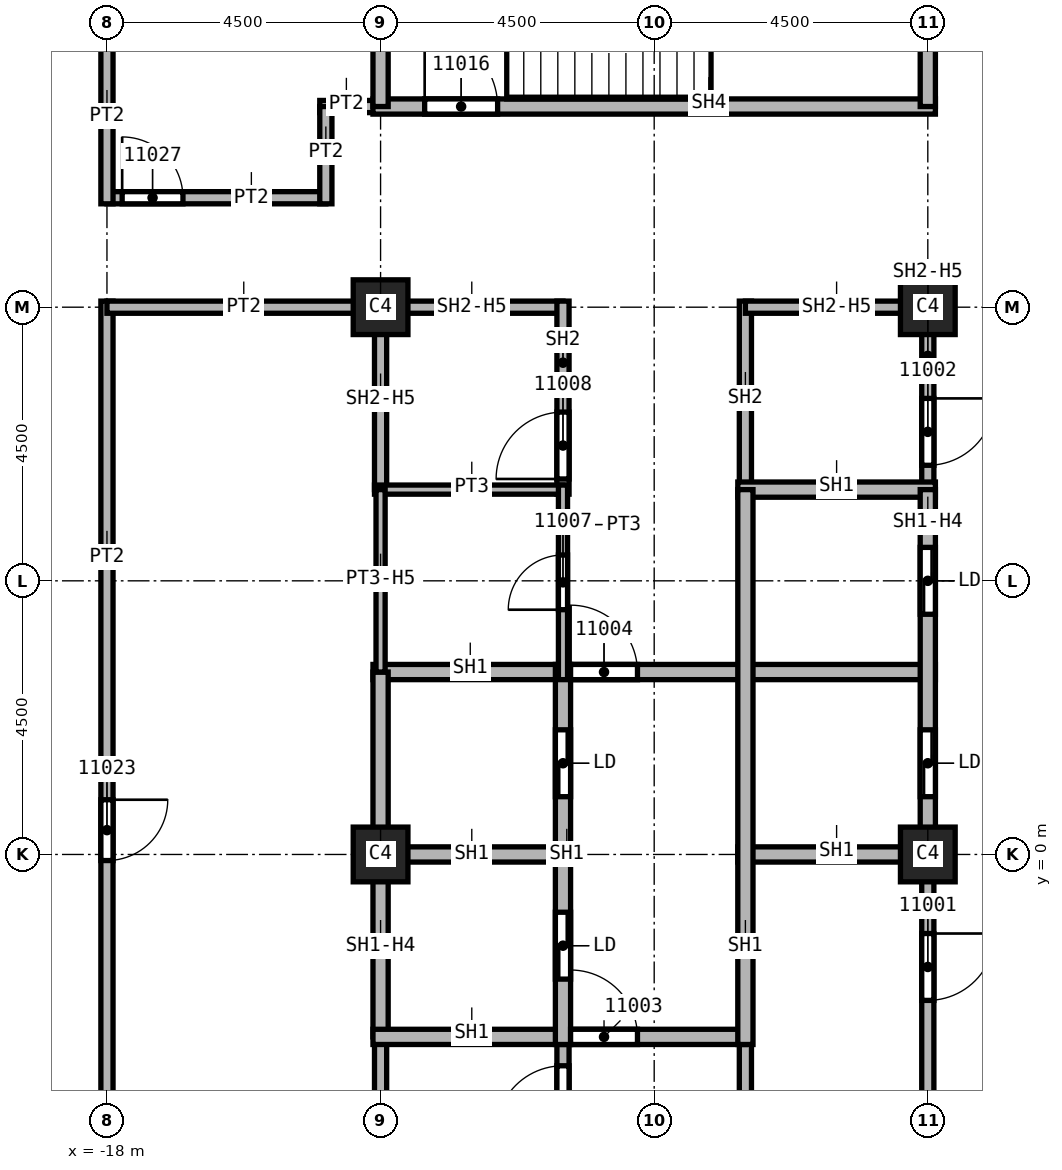
"""IFC4 building model, lengths in metres.
Left out: names, types, materials, properties, quantities, classifications, styles, units other than length and angle.
Written with IfcOpenShell. Run it as: python <this file> out.ifc"""

import sys

from ifc_helpers import new_model, si_unit, direction, frame, frame_2d, origin, origin_2d, place, context, subcontext, project, spatial, rectangle, extrude, element, fill, save


model = new_model("IFC4")
c1 = context("Model", 3, precision=1e-05, world=origin(), true_north=direction((0.0, 1.0)))
c2 = subcontext(c1, "Body", "Model", "MODEL_VIEW")
j1 = project(units=[si_unit("LENGTHUNIT", "METRE"), si_unit("PLANEANGLEUNIT", "RADIAN")], contexts=[c1])
p1 = place(None, origin())
s1 = spatial("IfcSite", under=j1, at=p1, CompositionType="ELEMENT")
p2 = place(p1, origin())
s2 = spatial("IfcBuilding", under=s1, at=p2, CompositionType="ELEMENT")
p3 = place(p2, frame((0.0, 0.0, 188.0)))
s3 = spatial("IfcBuildingStorey", under=s2, at=p3, CompositionType="ELEMENT", Elevation=188.0)
for number, where, z_axis, x_axis in (
    (1, (-4.5, 0.0, 0.0), (0.0, 0.0, 1.0), (1.0, 0.0, 0.0)),
    (2, (-4.5, 9.0, 0.0), (0.0, 0.0, 1.0), (1.0, 0.0, 0.0)),
    (3, (-13.5, 0.0, 0.0), (0.0, 0.0, 1.0), (1.0, 0.0, 0.0)),
    (4, (-13.5, 9.0, 0.0), (0.0, 0.0, 1.0), (1.0, 0.0, 0.0)),
):
    element("IfcColumn", number, at=place(p3, frame(where, z_axis=z_axis, x_axis=x_axis)), inside=s3, PredefinedType="COLUMN", context=c2, shape_type="SweptSolid", body=[
        extrude(rectangle(XDim=0.9, YDim=0.9, at=origin_2d()), origin(), (0.0, 0.0, 1.0), 3.72),
    ])
p4 = place(p3, frame((-18.0, 9.1, 0.0), z_axis=(0.0, 0.0, 1.0), x_axis=(0.0, -1.0, 0.0)))
e5 = element("IfcWall", 5, at=p4, inside=s3, PredefinedType="PARTITIONING", context=c2, shape_type="SweptSolid", body=[
    extrude(rectangle(XDim=18.2, YDim=0.2, at=frame_2d((9.1, 0.0))), origin(), (0.0, 0.0, 1.0), 3.72),
])
p5 = place(p4, frame((16.9, 0.0, 0.0)))
e6 = element("IfcOpeningElement", 6, at=p5, cuts=e5, PredefinedType="OPENING", context=c2, shape_type="SweptSolid", body=[
    extrude(rectangle(XDim=1.0, YDim=2.1, at=frame_2d((0.5, 1.05))), frame((0.0, 0.1, 0.0), z_axis=(0.0, -1.0, 0.0), x_axis=(1.0, 0.0, 0.0)), (0.0, 0.0, 1.0), 0.2),
])
p6 = place(p4, frame((8.2, 0.0, 0.0)))
e7 = element("IfcOpeningElement", 7, at=p6, cuts=e5, PredefinedType="OPENING", context=c2, shape_type="SweptSolid", body=[
    extrude(rectangle(XDim=1.0, YDim=2.1, at=frame_2d((0.5, 1.05))), frame((0.0, 0.1, 0.0), z_axis=(0.0, -1.0, 0.0), x_axis=(1.0, 0.0, 0.0)), (0.0, 0.0, 1.0), 0.2),
])
p7 = place(p3, frame((-18.0, 10.8, 0.0), z_axis=(0.0, 0.0, 1.0), x_axis=(1.0, 0.0, 0.0)))
e8 = element("IfcWall", 8, at=p7, inside=s3, PredefinedType="PARTITIONING", context=c2, shape_type="SweptSolid", body=[
    extrude(rectangle(XDim=3.6, YDim=0.2, at=frame_2d((1.8, 0.0))), origin(), (0.0, 0.0, 1.0), 3.72),
])
p8 = place(p7, frame((0.25, 0.0, 0.0)))
e9 = element("IfcOpeningElement", 9, at=p8, cuts=e8, PredefinedType="OPENING", context=c2, shape_type="SweptSolid", body=[
    extrude(rectangle(XDim=1.0, YDim=2.1, at=frame_2d((0.5, 1.05))), frame((0.0, 0.1, 0.0), z_axis=(0.0, -1.0, 0.0), x_axis=(1.0, 0.0, 0.0)), (0.0, 0.0, 1.0), 0.2),
])
p9 = place(p3, frame((-18.0, 13.6, 0.0), z_axis=(0.0, 0.0, 1.0), x_axis=(0.0, -1.0, 0.0)))
e10 = element("IfcWall", 10, at=p9, inside=s3, PredefinedType="PARTITIONING", context=c2, shape_type="SweptSolid", body=[
    extrude(rectangle(XDim=2.9, YDim=0.2, at=frame_2d((1.45, 0.0))), origin(), (0.0, 0.0, 1.0), 3.72),
])
p10 = place(p3, frame((-14.5, 12.3, 0.0), z_axis=(0.0, 0.0, 1.0), x_axis=(1.0, 0.0, 0.0)))
e11 = element("IfcWall", 11, at=p10, inside=s3, PredefinedType="PARTITIONING", context=c2, shape_type="SweptSolid", body=[
    extrude(rectangle(XDim=1.125, YDim=0.2, at=frame_2d((0.562, 0.0))), origin(), (0.0, 0.0, 1.0), 3.72),
])
p11 = place(p3, frame((-13.5, 9.0, 0.0), z_axis=(0.0, 0.0, 1.0), x_axis=(-1.0, 0.0, 0.0)))
e12 = element("IfcWall", 12, at=p11, inside=s3, PredefinedType="PARTITIONING", context=c2, shape_type="SweptSolid", body=[
    extrude(rectangle(XDim=4.5, YDim=0.2, at=frame_2d((2.25, 0.0))), origin(), (0.0, 0.0, 1.0), 3.72),
])
p12 = place(p3, frame((-14.4, 10.7, 0.0), z_axis=(0.0, 0.0, 1.0), x_axis=(0.0, 1.0, 0.0)))
e13 = element("IfcWall", 13, at=p12, inside=s3, PredefinedType="PARTITIONING", context=c2, shape_type="SweptSolid", body=[
    extrude(rectangle(XDim=1.6, YDim=0.2, at=frame_2d((0.8, 0.0))), origin(), (0.0, 0.0, 1.0), 3.72),
])
p13 = place(p3, frame((-13.6, 9.0, 0.0), z_axis=(0.0, 0.0, 1.0), x_axis=(1.0, 0.0, 0.0)))
e14 = element("IfcWall", 14, at=p13, inside=s3, PredefinedType="SOLIDWALL", context=c2, shape_type="SweptSolid", body=[
    extrude(rectangle(XDim=3.1, YDim=0.2, at=frame_2d((1.55, 0.0))), origin(), (0.0, 0.0, 1.0), 2.958),
])
p14 = place(p3, frame((-13.5, -7.0, 0.0), z_axis=(0.0, 0.0, 1.0), x_axis=(0.0, 1.0, 0.0)))
e15 = element("IfcWall", 15, at=p14, inside=s3, PredefinedType="SOLIDWALL", context=c2, shape_type="SweptSolid", body=[
    extrude(rectangle(XDim=4.0, YDim=0.2, at=frame_2d((2.0, 0.0))), origin(), (0.0, 0.0, 1.0), 2.958),
])
p15 = place(p3, frame((-13.5, 6.0, 0.0), z_axis=(0.0, 0.0, 1.0), x_axis=(0.0, 1.0, 0.0)))
e16 = element("IfcWall", 16, at=p15, inside=s3, PredefinedType="SOLIDWALL", context=c2, shape_type="SweptSolid", body=[
    extrude(rectangle(XDim=3.1, YDim=0.2, at=frame_2d((1.55, 0.0))), origin(), (0.0, 0.0, 1.0), 2.958),
])
p16 = place(p3, frame((-10.5, -7.075, 0.0), z_axis=(0.0, 0.0, 1.0), x_axis=(0.0, 1.0, 0.0)))
e17 = element("IfcWall", 17, at=p16, inside=s3, PredefinedType="SOLIDWALL", context=c2, shape_type="SweptSolid", body=[
    extrude(rectangle(XDim=4.2, YDim=0.2, at=frame_2d((2.1, 0.0))), origin(), (0.0, 0.0, 1.0), 3.72),
])
p17 = place(p16, frame((2.5, 0.0, 0.0)))
e18 = element("IfcOpeningElement", 18, at=p17, cuts=e17, PredefinedType="OPENING", context=c2, shape_type="SweptSolid", body=[
    extrude(rectangle(XDim=1.1, YDim=2.1, at=frame_2d((0.55, 1.05))), frame((0.0, 0.1, 0.0), z_axis=(0.0, -1.0, 0.0), x_axis=(1.0, 0.0, 0.0)), (0.0, 0.0, 1.0), 0.2),
])
p18 = place(p3, frame((-10.5, 5.925, 0.0), z_axis=(0.0, 0.0, 1.0), x_axis=(0.0, 1.0, 0.0)))
e19 = element("IfcWall", 19, at=p18, inside=s3, PredefinedType="SOLIDWALL", context=c2, shape_type="SweptSolid", body=[
    extrude(rectangle(XDim=3.175, YDim=0.2, at=frame_2d((1.587, 0.0))), origin(), (0.0, 0.0, 1.0), 3.72),
])
p19 = place(p18, frame((0.25, 0.0, 0.0)))
e20 = element("IfcOpeningElement", 20, at=p19, cuts=e19, PredefinedType="OPENING", context=c2, shape_type="SweptSolid", body=[
    extrude(rectangle(XDim=1.1, YDim=2.1, at=frame_2d((0.55, 1.05))), frame((0.0, 0.1, 0.0), z_axis=(0.0, -1.0, 0.0), x_axis=(1.0, 0.0, 0.0)), (0.0, 0.0, 1.0), 0.2),
])
p20 = place(p3, frame((-7.5, -9.1, 0.0), z_axis=(0.0, 0.0, 1.0), x_axis=(0.0, 1.0, 0.0)))
e21 = element("IfcWall", 21, at=p20, inside=s3, PredefinedType="SOLIDWALL", context=c2, shape_type="SweptSolid", body=[
    extrude(rectangle(XDim=6.225, YDim=0.2, at=frame_2d((3.113, 0.0))), origin(), (0.0, 0.0, 1.0), 3.72),
])
p21 = place(p3, frame((-7.5, 6.0, 0.0), z_axis=(0.0, 0.0, 1.0), x_axis=(0.0, 1.0, 0.0)))
e22 = element("IfcWall", 22, at=p21, inside=s3, PredefinedType="SOLIDWALL", context=c2, shape_type="SweptSolid", body=[
    extrude(rectangle(XDim=3.1, YDim=0.2, at=frame_2d((1.55, 0.0))), origin(), (0.0, 0.0, 1.0), 3.72),
])
p22 = place(p3, frame((-7.5, 9.0, 0.0), z_axis=(0.0, 0.0, 1.0), x_axis=(1.0, 0.0, 0.0)))
e23 = element("IfcWall", 23, at=p22, inside=s3, PredefinedType="SOLIDWALL", context=c2, shape_type="SweptSolid", body=[
    extrude(rectangle(XDim=3.0, YDim=0.2, at=frame_2d((1.5, 0.0))), origin(), (0.0, 0.0, 1.0), 2.958),
])
p23 = place(p3, frame((-4.5, 0.0, 0.0), z_axis=(0.0, 0.0, 1.0), x_axis=(0.0, -1.0, 0.0)))
e24 = element("IfcWall", 24, at=p23, inside=s3, PredefinedType="SOLIDWALL", context=c2, shape_type="SweptSolid", body=[
    extrude(rectangle(XDim=9.1, YDim=0.2, at=frame_2d((4.55, 0.0))), origin(), (0.0, 0.0, 1.0), 2.958),
])
p24 = place(p23, frame((1.3, 0.0, 0.0)))
e25 = element("IfcOpeningElement", 25, at=p24, cuts=e24, PredefinedType="OPENING", context=c2, shape_type="SweptSolid", body=[
    extrude(rectangle(XDim=1.1, YDim=2.1, at=frame_2d((0.55, 1.05))), frame((0.0, 0.1, 0.0), z_axis=(0.0, -1.0, 0.0), x_axis=(1.0, 0.0, 0.0)), (0.0, 0.0, 1.0), 0.2),
])
p25 = place(p3, frame((-4.5, 9.1, 0.0), z_axis=(0.0, 0.0, 1.0), x_axis=(0.0, -1.0, 0.0)))
e26 = element("IfcWall", 26, at=p25, inside=s3, PredefinedType="SOLIDWALL", context=c2, shape_type="SweptSolid", body=[
    extrude(rectangle(XDim=3.1, YDim=0.2, at=frame_2d((1.55, 0.0))), origin(), (0.0, 0.0, 1.0), 2.958),
])
p26 = place(p25, frame((1.6, 0.0, 0.0)))
e27 = element("IfcOpeningElement", 27, at=p26, cuts=e26, PredefinedType="OPENING", context=c2, shape_type="SweptSolid", body=[
    extrude(rectangle(XDim=1.1, YDim=2.1, at=frame_2d((0.55, 1.05))), frame((0.0, 0.1, 0.0), z_axis=(0.0, -1.0, 0.0), x_axis=(1.0, 0.0, 0.0)), (0.0, 0.0, 1.0), 0.2),
])
p27 = place(p3, frame((-13.625, 0.0, 0.0), z_axis=(0.0, 0.0, 1.0), x_axis=(1.0, 0.0, 0.0)))
e28 = element("IfcWall", 28, at=p27, inside=s3, PredefinedType="SOLIDWALL", context=c2, shape_type="SweptSolid", body=[
    extrude(rectangle(XDim=3.125, YDim=0.25, at=frame_2d((1.562, 0.0))), origin(), (0.0, 0.0, 1.0), 3.72),
])
p28 = place(p3, frame((-13.625, 3.0, 0.0), z_axis=(0.0, 0.0, 1.0), x_axis=(1.0, 0.0, 0.0)))
e29 = element("IfcWall", 29, at=p28, inside=s3, PredefinedType="SOLIDWALL", context=c2, shape_type="SweptSolid", body=[
    extrude(rectangle(XDim=9.25, YDim=0.25, at=frame_2d((4.625, 0.0))), origin(), (0.0, 0.0, 1.0), 3.72),
])
p29 = place(p28, frame((3.25, 0.0, 0.0)))
e30 = element("IfcOpeningElement", 30, at=p29, cuts=e29, PredefinedType="OPENING", context=c2, shape_type="SweptSolid", body=[
    extrude(rectangle(XDim=1.1, YDim=2.1, at=frame_2d((0.55, 1.05))), frame((0.0, 0.125, 0.0), z_axis=(0.0, -1.0, 0.0), x_axis=(1.0, 0.0, 0.0)), (0.0, 0.0, 1.0), 0.25),
])
p30 = place(p3, frame((-13.5, -3.0, 0.0), z_axis=(0.0, 0.0, 1.0), x_axis=(0.0, 1.0, 0.0)))
e31 = element("IfcWall", 31, at=p30, inside=s3, PredefinedType="SOLIDWALL", context=c2, shape_type="SweptSolid", body=[
    extrude(rectangle(XDim=6.0, YDim=0.25, at=frame_2d((3.0, 0.0))), origin(), (0.0, 0.0, 1.0), 2.958),
])
p31 = place(p3, frame((-13.625, -3.0, 0.0), z_axis=(0.0, 0.0, 1.0), x_axis=(1.0, 0.0, 0.0)))
e32 = element("IfcWall", 32, at=p31, inside=s3, PredefinedType="SOLIDWALL", context=c2, shape_type="SweptSolid", body=[
    extrude(rectangle(XDim=6.125, YDim=0.25, at=frame_2d((3.062, 0.0))), origin(), (0.0, 0.0, 1.0), 3.72),
])
p32 = place(p31, frame((3.25, 0.0, 0.0)))
e33 = element("IfcOpeningElement", 33, at=p32, cuts=e32, PredefinedType="OPENING", context=c2, shape_type="SweptSolid", body=[
    extrude(rectangle(XDim=1.1, YDim=2.1, at=frame_2d((0.55, 1.05))), frame((0.0, 0.125, 0.0), z_axis=(0.0, -1.0, 0.0), x_axis=(1.0, 0.0, 0.0)), (0.0, 0.0, 1.0), 0.25),
])
p33 = place(p3, frame((-10.5, -3.125, 0.0), z_axis=(0.0, 0.0, 1.0), x_axis=(0.0, 1.0, 0.0)))
e34 = element("IfcWall", 34, at=p33, inside=s3, PredefinedType="SOLIDWALL", context=c2, shape_type="SweptSolid", body=[
    extrude(rectangle(XDim=6.25, YDim=0.25, at=frame_2d((3.125, 0.0))), origin(), (0.0, 0.0, 1.0), 3.72),
])
p34 = place(p33, frame((1.075, 0.0, 0.0)))
e35 = element("IfcOpeningElement", 35, at=p34, cuts=e34, PredefinedType="OPENING", context=c2, shape_type="SweptSolid", body=[
    extrude(rectangle(XDim=1.1, YDim=2.1, at=frame_2d((0.55, 1.05))), frame((0.0, 0.125, 0.0), z_axis=(0.0, -1.0, 0.0), x_axis=(1.0, 0.0, 0.0)), (0.0, 0.0, 1.0), 0.25),
])
p35 = place(p33, frame((4.075, 0.0, 0.0)))
e36 = element("IfcOpeningElement", 36, at=p35, cuts=e34, PredefinedType="OPENING", context=c2, shape_type="SweptSolid", body=[
    extrude(rectangle(XDim=1.1, YDim=2.1, at=frame_2d((0.55, 1.05))), frame((0.0, 0.125, 0.0), z_axis=(0.0, -1.0, 0.0), x_axis=(1.0, 0.0, 0.0)), (0.0, 0.0, 1.0), 0.25),
])
for number, where, z_axis, x_axis in (
    (37, (-7.625, 0.0, 0.0), (0.0, 0.0, 1.0), (1.0, 0.0, 0.0)),
    (38, (-7.625, 6.0, 0.0), (0.0, 0.0, 1.0), (1.0, 0.0, 0.0)),
):
    element("IfcWall", number, at=place(p3, frame(where, z_axis=z_axis, x_axis=x_axis)), inside=s3, PredefinedType="SOLIDWALL", context=c2, shape_type="SweptSolid", body=[
        extrude(rectangle(XDim=3.25, YDim=0.25, at=frame_2d((1.625, 0.0))), origin(), (0.0, 0.0, 1.0), 3.72),
    ])
p36 = place(p3, frame((-7.5, -3.125, 0.0), z_axis=(0.0, 0.0, 1.0), x_axis=(0.0, 1.0, 0.0)))
e39 = element("IfcWall", 39, at=p36, inside=s3, PredefinedType="SOLIDWALL", context=c2, shape_type="SweptSolid", body=[
    extrude(rectangle(XDim=9.125, YDim=0.25, at=frame_2d((4.562, 0.0))), origin(), (0.0, 0.0, 1.0), 3.72),
])
p37 = place(p3, frame((-4.5, 6.0, 0.0), z_axis=(0.0, 0.0, 1.0), x_axis=(0.0, -1.0, 0.0)))
e40 = element("IfcWall", 40, at=p37, inside=s3, PredefinedType="SOLIDWALL", context=c2, shape_type="SweptSolid", body=[
    extrude(rectangle(XDim=6.0, YDim=0.25, at=frame_2d((3.0, 0.0))), origin(), (0.0, 0.0, 1.0), 2.958),
])
p38 = place(p37, frame((3.95, 0.0, 0.0)))
e41 = element("IfcOpeningElement", 41, at=p38, cuts=e40, PredefinedType="OPENING", context=c2, shape_type="SweptSolid", body=[
    extrude(rectangle(XDim=1.1, YDim=2.1, at=frame_2d((0.55, 1.05))), frame((0.0, 0.125, 0.0), z_axis=(0.0, -1.0, 0.0), x_axis=(1.0, 0.0, 0.0)), (0.0, 0.0, 1.0), 0.25),
])
p39 = place(p37, frame((0.95, 0.0, 0.0)))
e42 = element("IfcOpeningElement", 42, at=p39, cuts=e40, PredefinedType="OPENING", context=c2, shape_type="SweptSolid", body=[
    extrude(rectangle(XDim=1.1, YDim=2.1, at=frame_2d((0.55, 1.05))), frame((0.0, 0.125, 0.0), z_axis=(0.0, -1.0, 0.0), x_axis=(1.0, 0.0, 0.0)), (0.0, 0.0, 1.0), 0.25),
])
p40 = place(p3, frame((-13.625, 12.3, 0.0), z_axis=(0.0, 0.0, 1.0), x_axis=(1.0, 0.0, 0.0)))
e43 = element("IfcWall", 43, at=p40, inside=s3, PredefinedType="SOLIDWALL", context=c2, shape_type="SweptSolid", body=[
    extrude(rectangle(XDim=9.25, YDim=0.25, at=frame_2d((4.625, 0.0))), origin(), (0.0, 0.0, 1.0), 3.72),
])
p41 = place(p40, frame((0.85, 0.0, 0.0)))
e44 = element("IfcOpeningElement", 44, at=p41, cuts=e43, PredefinedType="OPENING", context=c2, shape_type="SweptSolid", body=[
    extrude(rectangle(XDim=1.2, YDim=2.1, at=frame_2d((0.6, 1.05))), frame((0.0, 0.125, 0.0), z_axis=(0.0, -1.0, 0.0), x_axis=(1.0, 0.0, 0.0)), (0.0, 0.0, 1.0), 0.25),
])
for number, where, z_axis, x_axis in (
    (45, (-13.5, 12.3, 0.0), (0.0, 0.0, 1.0), (0.0, 1.0, 0.0)),
    (46, (-4.5, 16.8, 0.0), (0.0, 0.0, 1.0), (0.0, -1.0, 0.0)),
):
    element("IfcWall", number, at=place(p3, frame(where, z_axis=z_axis, x_axis=x_axis)), inside=s3, PredefinedType="SOLIDWALL", context=c2, shape_type="SweptSolid", body=[
        extrude(rectangle(XDim=4.5, YDim=0.25, at=frame_2d((2.25, 0.0))), origin(), (0.0, 0.0, 1.0), 3.72),
    ])
p42 = place(p3, frame((-13.6, 6.0, 0.0), z_axis=(0.0, 0.0, 1.0), x_axis=(1.0, 0.0, 0.0)))
e47 = element("IfcWall", 47, at=p42, inside=s3, PredefinedType="PARTITIONING", context=c2, shape_type="SweptSolid", body=[
    extrude(rectangle(XDim=3.1, YDim=0.15, at=frame_2d((1.55, 0.0))), origin(), (0.0, 0.0, 1.0), 3.72),
])
p43 = place(p3, frame((-13.5, 3.0, 0.0), z_axis=(0.0, 0.0, 1.0), x_axis=(0.0, 1.0, 0.0)))
e48 = element("IfcWall", 48, at=p43, inside=s3, PredefinedType="PARTITIONING", context=c2, shape_type="SweptSolid", body=[
    extrude(rectangle(XDim=3.0, YDim=0.15, at=frame_2d((1.5, 0.0))), origin(), (0.0, 0.0, 1.0), 2.958),
])
p44 = place(p3, frame((-10.5, 2.875, 0.0), z_axis=(0.0, 0.0, 1.0), x_axis=(0.0, 1.0, 0.0)))
e49 = element("IfcWall", 49, at=p44, inside=s3, PredefinedType="PARTITIONING", context=c2, shape_type="SweptSolid", body=[
    extrude(rectangle(XDim=3.2, YDim=0.15, at=frame_2d((1.6, 0.0))), origin(), (0.0, 0.0, 1.0), 3.72),
])
p45 = place(p44, frame((1.15, 0.0, 0.0)))
e50 = element("IfcOpeningElement", 50, at=p45, cuts=e49, PredefinedType="OPENING", context=c2, shape_type="SweptSolid", body=[
    extrude(rectangle(XDim=0.9, YDim=2.1, at=frame_2d((0.45, 1.05))), frame((0.0, 0.075, 0.0), z_axis=(0.0, -1.0, 0.0), x_axis=(1.0, 0.0, 0.0)), (0.0, 0.0, 1.0), 0.15),
])
p46 = place(p24, origin())
e51 = element("IfcDoor", 51, at=p46, inside=s3, OperationType="SINGLE_SWING_RIGHT", PredefinedType="DOOR", context=c2, shape_type="SweptSolid", body=[
    extrude(rectangle(XDim=1.1, YDim=2.1, at=frame_2d((0.55, 1.05))), frame((0.0, 0.025, 0.0), z_axis=(0.0, -1.0, 0.0), x_axis=(1.0, 0.0, 0.0)), (0.0, 0.0, 1.0), 0.05),
])
fill(e25, e51)
p47 = place(p26, origin())
e52 = element("IfcDoor", 52, at=p47, inside=s3, OperationType="SINGLE_SWING_LEFT", PredefinedType="DOOR", context=c2, shape_type="SweptSolid", body=[
    extrude(rectangle(XDim=1.1, YDim=2.1, at=frame_2d((0.55, 1.05))), frame((0.0, 0.025, 0.0), z_axis=(0.0, -1.0, 0.0), x_axis=(1.0, 0.0, 0.0)), (0.0, 0.0, 1.0), 0.05),
])
fill(e27, e52)
p48 = place(p32, origin())
e53 = element("IfcDoor", 53, at=p48, inside=s3, OperationType="SINGLE_SWING_RIGHT", PredefinedType="DOOR", context=c2, shape_type="SweptSolid", body=[
    extrude(rectangle(XDim=1.1, YDim=2.1, at=frame_2d((0.55, 1.05))), frame((0.0, 0.025, 0.0), z_axis=(0.0, -1.0, 0.0), x_axis=(1.0, 0.0, 0.0)), (0.0, 0.0, 1.0), 0.05),
])
fill(e33, e53)
p49 = place(p29, origin())
e54 = element("IfcDoor", 54, at=p49, inside=s3, OperationType="SINGLE_SWING_LEFT", PredefinedType="DOOR", context=c2, shape_type="SweptSolid", body=[
    extrude(rectangle(XDim=1.1, YDim=2.1, at=frame_2d((0.55, 1.05))), frame((0.0, 0.025, 0.0), z_axis=(0.0, -1.0, 0.0), x_axis=(1.0, 0.0, 0.0)), (0.0, 0.0, 1.0), 0.05),
])
fill(e30, e54)
p50 = place(p17, origin())
e55 = element("IfcDoor", 55, at=p50, inside=s3, OperationType="SINGLE_SWING_LEFT", PredefinedType="DOOR", context=c2, shape_type="SweptSolid", body=[
    extrude(rectangle(XDim=1.1, YDim=2.1, at=frame_2d((0.55, 1.05))), frame((0.0, 0.025, 0.0), z_axis=(0.0, -1.0, 0.0), x_axis=(1.0, 0.0, 0.0)), (0.0, 0.0, 1.0), 0.05),
])
fill(e18, e55)
p51 = place(p45, origin())
e56 = element("IfcDoor", 56, at=p51, inside=s3, OperationType="SINGLE_SWING_RIGHT", PredefinedType="DOOR", context=c2, shape_type="SweptSolid", body=[
    extrude(rectangle(XDim=0.9, YDim=2.1, at=frame_2d((0.45, 1.05))), frame((0.0, 0.025, 0.0), z_axis=(0.0, -1.0, 0.0), x_axis=(1.0, 0.0, 0.0)), (0.0, 0.0, 1.0), 0.05),
])
fill(e50, e56)
p52 = place(p19, origin())
e57 = element("IfcDoor", 57, at=p52, inside=s3, OperationType="SINGLE_SWING_LEFT", PredefinedType="DOOR", context=c2, shape_type="SweptSolid", body=[
    extrude(rectangle(XDim=1.1, YDim=2.1, at=frame_2d((0.55, 1.05))), frame((0.0, 0.025, 0.0), z_axis=(0.0, -1.0, 0.0), x_axis=(1.0, 0.0, 0.0)), (0.0, 0.0, 1.0), 0.05),
])
fill(e20, e57)
p53 = place(p41, origin())
e58 = element("IfcDoor", 58, at=p53, inside=s3, OperationType="SINGLE_SWING_LEFT", PredefinedType="DOOR", context=c2, shape_type="SweptSolid", body=[
    extrude(rectangle(XDim=1.2, YDim=2.1, at=frame_2d((0.6, 1.05))), frame((0.0, 0.025, 0.0), z_axis=(0.0, -1.0, 0.0), x_axis=(1.0, 0.0, 0.0)), (0.0, 0.0, 1.0), 0.05),
])
fill(e44, e58)
p54 = place(p6, origin())
e59 = element("IfcDoor", 59, at=p54, inside=s3, OperationType="SINGLE_SWING_RIGHT", PredefinedType="DOOR", context=c2, shape_type="SweptSolid", body=[
    extrude(rectangle(XDim=1.0, YDim=2.1, at=frame_2d((0.5, 1.05))), frame((0.0, 0.025, 0.0), z_axis=(0.0, -1.0, 0.0), x_axis=(1.0, 0.0, 0.0)), (0.0, 0.0, 1.0), 0.05),
])
fill(e7, e59)
p55 = place(p8, origin())
e60 = element("IfcDoor", 60, at=p55, inside=s3, OperationType="SINGLE_SWING_RIGHT", PredefinedType="DOOR", context=c2, shape_type="SweptSolid", body=[
    extrude(rectangle(XDim=1.0, YDim=2.1, at=frame_2d((0.5, 1.05))), frame((0.0, 0.025, 0.0), z_axis=(0.0, -1.0, 0.0), x_axis=(1.0, 0.0, 0.0)), (0.0, 0.0, 1.0), 0.05),
])
fill(e9, e60)
p56 = place(p38, origin())
e61 = element("IfcDoor", 61, at=p56, inside=s3, OperationType="SLIDING_TO_LEFT", PredefinedType="DOOR", context=c2, shape_type="SweptSolid", body=[
    extrude(rectangle(XDim=1.1, YDim=2.1, at=frame_2d((0.55, 1.05))), frame((0.0, 0.025, 0.0), z_axis=(0.0, -1.0, 0.0), x_axis=(1.0, 0.0, 0.0)), (0.0, 0.0, 1.0), 0.05),
])
fill(e41, e61)
p57 = place(p39, origin())
e62 = element("IfcDoor", 62, at=p57, inside=s3, OperationType="SLIDING_TO_LEFT", PredefinedType="DOOR", context=c2, shape_type="SweptSolid", body=[
    extrude(rectangle(XDim=1.1, YDim=2.1, at=frame_2d((0.55, 1.05))), frame((0.0, 0.025, 0.0), z_axis=(0.0, -1.0, 0.0), x_axis=(1.0, 0.0, 0.0)), (0.0, 0.0, 1.0), 0.05),
])
fill(e42, e62)
p58 = place(p34, origin())
e63 = element("IfcDoor", 63, at=p58, inside=s3, OperationType="SLIDING_TO_LEFT", PredefinedType="DOOR", context=c2, shape_type="SweptSolid", body=[
    extrude(rectangle(XDim=1.1, YDim=2.1, at=frame_2d((0.55, 1.05))), frame((0.0, 0.025, 0.0), z_axis=(0.0, -1.0, 0.0), x_axis=(1.0, 0.0, 0.0)), (0.0, 0.0, 1.0), 0.05),
])
fill(e35, e63)
p59 = place(p35, origin())
e64 = element("IfcDoor", 64, at=p59, inside=s3, OperationType="SLIDING_TO_LEFT", PredefinedType="DOOR", context=c2, shape_type="SweptSolid", body=[
    extrude(rectangle(XDim=1.1, YDim=2.1, at=frame_2d((0.55, 1.05))), frame((0.0, 0.025, 0.0), z_axis=(0.0, -1.0, 0.0), x_axis=(1.0, 0.0, 0.0)), (0.0, 0.0, 1.0), 0.05),
])
fill(e36, e64)
save(model, sys.argv[1])
